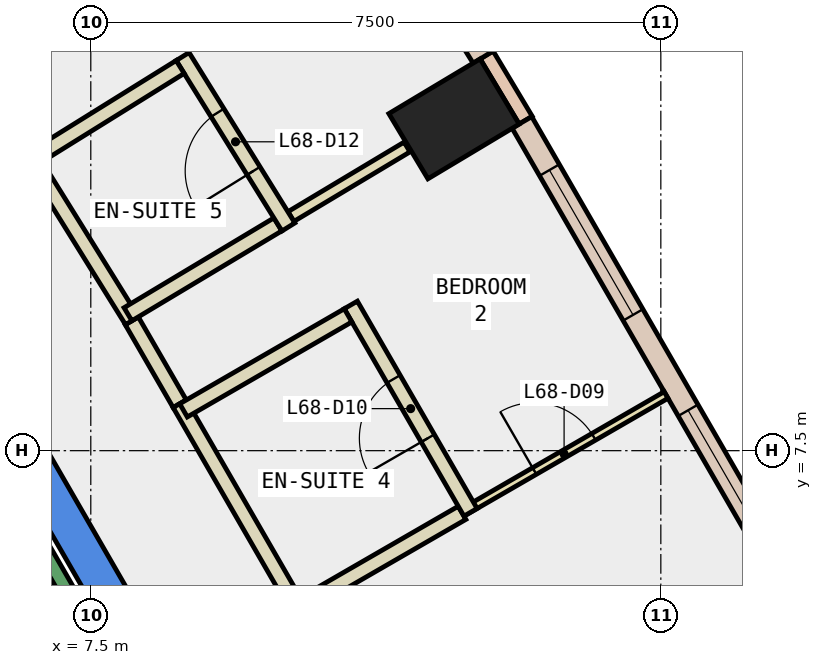
"""IFC4 building model, lengths in metres.
Left out: names, types, materials, properties, quantities, classifications, styles, units other than length and angle.
Written with IfcOpenShell. Run it as: python <this file> out.ifc"""

import sys

from ifc_helpers import new_model, si_unit, direction, frame, frame_2d, origin, origin_2d, place, context, subcontext, project, spatial, polyline, rectangle, outline, extrude, element, fill, save


model = new_model("IFC4")
c1 = context("Model", 3, precision=1e-05, world=origin(), true_north=direction((0.0, 1.0)))
c2 = subcontext(c1, "Body", "Model", "MODEL_VIEW")
j1 = project(units=[si_unit("LENGTHUNIT", "METRE"), si_unit("PLANEANGLEUNIT", "RADIAN")], contexts=[c1])
p1 = place(None, origin())
s1 = spatial("IfcSite", under=j1, at=p1, CompositionType="ELEMENT")
p2 = place(p1, origin())
s2 = spatial("IfcBuilding", under=s1, at=p2, CompositionType="ELEMENT")
p3 = place(p2, frame((0.0, 0.0, 293.6)))
s3 = spatial("IfcBuildingStorey", under=s2, at=p3, CompositionType="ELEMENT", Elevation=293.6)
p4 = place(p3, frame((12.279, 11.865, -0.34), z_axis=(0.0, 0.0, 1.0), x_axis=(-0.513945548584, 0.857822809845, 0.0)))
e1 = element("IfcColumn", 1, at=p4, inside=s3, PredefinedType="COLUMN", context=c2, shape_type="SweptSolid", body=[
    extrude(rectangle(XDim=1.0, YDim=1.4, at=origin_2d()), origin(), (0.0, 0.0, 1.0), 3.6),
])
p5 = place(p3, frame((0.0, 0.0, -0.34)))
e2 = element("IfcWall", 2, at=p5, inside=s3, PredefinedType="SHEAR", context=c2, shape_type="SweptSolid", body=[
    extrude(outline(polyline([(5.486, 9.998), (5.053, 9.748), (9.238, 2.5), (9.815, 2.5), (5.486, 9.998)])), origin(), (0.0, 0.0, 1.0), 3.6),
])
p6 = place(p3, frame((13.222, 11.848, 0.0), z_axis=(0.0, 0.0, 1.0), x_axis=(-0.513777707721, 0.857923345672, 0.0)))
e3 = element("IfcWall", 3, at=p6, inside=s3, PredefinedType="STANDARD", context=c2, shape_type="SweptSolid", body=[
    extrude(rectangle(XDim=1.0, YDim=0.2, at=frame_2d((0.5, 0.0))), origin(), (0.0, 0.0, 1.0), 3.26),
])
p7 = place(p3, frame((16.821, 5.498, 0.0), z_axis=(0.0, 0.0, 1.0), x_axis=(-0.499945412946, 0.866056917341, 0.0)))
e4 = element("IfcWall", 4, at=p7, inside=s3, PredefinedType="STANDARD", context=c2, shape_type="SweptSolid", body=[
    extrude(rectangle(XDim=7.299, YDim=0.3, at=frame_2d((3.649, 0.0))), origin(), (0.0, 0.0, 1.0), 3.26),
])
p8 = place(p7, frame((0.725, 0.0, 0.9)))
e5 = element("IfcOpeningElement", 5, at=p8, cuts=e4, PredefinedType="OPENING", context=c2, shape_type="SweptSolid", body=[
    extrude(rectangle(XDim=2.2, YDim=2.0, at=frame_2d((1.1, 1.0))), frame((0.0, 0.16, 0.0), z_axis=(0.0, -1.0, 0.0), x_axis=(1.0, 0.0, 0.0)), (0.0, 0.0, 1.0), 0.32),
])
p9 = place(p7, frame((4.374, 0.0, 0.9)))
e6 = element("IfcOpeningElement", 6, at=p9, cuts=e4, PredefinedType="OPENING", context=c2, shape_type="SweptSolid", body=[
    extrude(rectangle(XDim=2.2, YDim=2.0, at=frame_2d((1.1, 1.0))), frame((0.0, 0.16, 0.0), z_axis=(0.0, -1.0, 0.0), x_axis=(1.0, 0.0, 0.0)), (0.0, 0.0, 1.0), 0.32),
])
p10 = place(p3, frame((12.659, 12.675, 0.0), z_axis=(0.0, 0.0, 1.0), x_axis=(-0.527762071678, 0.849392250788, 0.0)))
e7 = element("IfcWall", 7, at=p10, inside=s3, PredefinedType="STANDARD", context=c2, shape_type="SweptSolid", body=[
    extrude(rectangle(XDim=7.276, YDim=0.3, at=frame_2d((3.638, 0.0))), origin(), (0.0, 0.0, 1.0), 3.26),
])
p11 = place(p10, frame((0.719, 0.0, 0.9)))
e8 = element("IfcOpeningElement", 8, at=p11, cuts=e7, PredefinedType="OPENING", context=c2, shape_type="SweptSolid", body=[
    extrude(rectangle(XDim=2.2, YDim=2.0, at=frame_2d((1.1, 1.0))), frame((0.0, 0.16, 0.0), z_axis=(0.0, -1.0, 0.0), x_axis=(1.0, 0.0, 0.0)), (0.0, 0.0, 1.0), 0.32),
])
p12 = place(p10, frame((4.357, 0.0, 0.9)))
e9 = element("IfcOpeningElement", 9, at=p12, cuts=e7, PredefinedType="OPENING", context=c2, shape_type="SweptSolid", body=[
    extrude(rectangle(XDim=2.2, YDim=2.0, at=frame_2d((1.1, 1.0))), frame((0.0, 0.16, 0.0), z_axis=(0.0, -1.0, 0.0), x_axis=(1.0, 0.0, 0.0)), (0.0, 0.0, 1.0), 0.32),
])
p13 = place(p3, frame((8.039, 9.209, 0.0), z_axis=(0.0, 0.0, 1.0), x_axis=(0.500219543227, -0.865898613334, 0.0)))
e10 = element("IfcWall", 10, at=p13, inside=s3, PredefinedType="PARTITIONING", context=c2, shape_type="SweptSolid", body=[
    extrude(rectangle(XDim=1.261, YDim=0.2, at=frame_2d((0.631, 0.0))), origin(), (0.0, 0.0, 1.0), 3.26),
])
p14 = place(p3, frame((8.67, 8.117, 0.0), z_axis=(0.0, 0.0, 1.0), x_axis=(0.50002537861, -0.866010750942, 0.0)))
e11 = element("IfcWall", 11, at=p14, inside=s3, PredefinedType="PARTITIONING", context=c2, shape_type="SweptSolid", body=[
    extrude(rectangle(XDim=3.0, YDim=0.2, at=frame_2d((1.5, 0.0))), origin(), (0.0, 0.0, 1.0), 3.26),
])
p15 = place(p3, frame((6.775, 11.249, 0.0), z_axis=(0.0, 0.0, 1.0), x_axis=(0.527803270752, -0.849366650736, 0.0)))
e12 = element("IfcWall", 12, at=p15, inside=s3, PredefinedType="PARTITIONING", context=c2, shape_type="SweptSolid", body=[
    extrude(rectangle(XDim=2.401, YDim=0.2, at=frame_2d((1.2, 0.0))), origin(), (0.0, 0.0, 1.0), 3.26),
])
p16 = place(p3, frame((12.385, 6.682, 0.0), z_axis=(0.0, 0.0, 1.0), x_axis=(0.865970446821, 0.500095176175, 0.0)))
e13 = element("IfcWall", 13, at=p16, inside=s3, PredefinedType="PARTITIONING", context=c2, shape_type="SweptSolid", body=[
    extrude(rectangle(XDim=3.1, YDim=0.1, at=frame_2d((1.55, 0.0))), origin(), (0.0, 0.0, 1.0), 3.26),
])
p17 = place(p16, frame((1.1, 0.0, 0.0)))
e14 = element("IfcOpeningElement", 14, at=p17, cuts=e13, PredefinedType="OPENING", context=c2, shape_type="SweptSolid", body=[
    extrude(rectangle(XDim=0.9, YDim=2.1, at=frame_2d((0.45, 1.05))), frame((0.0, 0.06, 0.0), z_axis=(0.0, -1.0, 0.0), x_axis=(1.0, 0.0, 0.0)), (0.0, 0.0, 1.0), 0.12),
])
p18 = place(p3, frame((10.306, 5.482, 0.0), z_axis=(0.0, 0.0, 1.0), x_axis=(0.866100915363, 0.499869187296, 0.0)))
e15 = element("IfcWall", 15, at=p18, inside=s3, PredefinedType="PARTITIONING", context=c2, shape_type="SweptSolid", body=[
    extrude(rectangle(XDim=2.401, YDim=0.2, at=frame_2d((1.2, 0.0))), origin(), (0.0, 0.0, 1.0), 3.26),
])
p19 = place(p3, frame((12.496, 6.689, 0.0), z_axis=(0.0, 0.0, 1.0), x_axis=(-0.500039995618, 0.866002311072, 0.0)))
e16 = element("IfcWall", 16, at=p19, inside=s3, PredefinedType="PARTITIONING", context=c2, shape_type="SweptSolid", body=[
    extrude(rectangle(XDim=3.15, YDim=0.2, at=frame_2d((1.575, 0.0))), origin(), (0.0, 0.0, 1.0), 3.26),
])
p20 = place(p19, frame((1.125, 0.0, 0.0)))
e17 = element("IfcOpeningElement", 17, at=p20, cuts=e16, PredefinedType="OPENING", context=c2, shape_type="SweptSolid", body=[
    extrude(rectangle(XDim=0.9, YDim=2.1, at=frame_2d((0.45, 1.05))), frame((0.0, 0.11, 0.0), z_axis=(0.0, -1.0, 0.0), x_axis=(1.0, 0.0, 0.0)), (0.0, 0.0, 1.0), 0.22),
])
p21 = place(p3, frame((10.885, 9.28, 0.0), z_axis=(0.0, 0.0, 1.0), x_axis=(-0.866022959057, -0.500004234368, 0.0)))
e18 = element("IfcWall", 18, at=p21, inside=s3, PredefinedType="PARTITIONING", context=c2, shape_type="SweptSolid", body=[
    extrude(rectangle(XDim=2.5, YDim=0.2, at=frame_2d((1.25, 0.0))), origin(), (0.0, 0.0, 1.0), 3.26),
])
p22 = place(p3, frame((10.133, 10.58, 0.0), z_axis=(0.0, 0.0, 1.0), x_axis=(0.857903919212, 0.513810145287, 0.0)))
e19 = element("IfcWall", 19, at=p22, inside=s3, PredefinedType="PARTITIONING", context=c2, shape_type="SweptSolid", body=[
    extrude(rectangle(XDim=1.781, YDim=0.15, at=frame_2d((0.891, 0.0))), origin(), (0.0, 0.0, 1.0), 3.26),
])
p23 = place(p3, frame((7.989, 9.295, 0.0), z_axis=(0.0, 0.0, 1.0), x_axis=(0.857801856135, 0.513980520654, 0.0)))
e20 = element("IfcWall", 20, at=p23, inside=s3, PredefinedType="PARTITIONING", context=c2, shape_type="SweptSolid", body=[
    extrude(rectangle(XDim=2.3, YDim=0.2, at=frame_2d((1.15, 0.0))), origin(), (0.0, 0.0, 1.0), 3.26),
])
p24 = place(p3, frame((10.1, 10.443, 0.0), z_axis=(0.0, 0.0, 1.0), x_axis=(-0.527510239672, 0.849548672555, 0.0)))
e21 = element("IfcWall", 21, at=p24, inside=s3, PredefinedType="PARTITIONING", context=c2, shape_type="SweptSolid", body=[
    extrude(rectangle(XDim=2.639, YDim=0.2, at=frame_2d((1.319, 0.0))), origin(), (0.0, 0.0, 1.0), 3.26),
])
p25 = place(p24, frame((0.869, 0.0, 0.0)))
e22 = element("IfcOpeningElement", 22, at=p25, cuts=e21, PredefinedType="OPENING", context=c2, shape_type="SweptSolid", body=[
    extrude(rectangle(XDim=0.9, YDim=2.1, at=frame_2d((0.45, 1.05))), frame((0.0, 0.11, 0.0), z_axis=(0.0, -1.0, 0.0), x_axis=(1.0, 0.0, 0.0)), (0.0, 0.0, 1.0), 0.22),
])
p26 = place(p3, frame((8.676, 12.548, 0.0), z_axis=(0.0, 0.0, 1.0), x_axis=(-0.849286670427, -0.527931957202, 0.0)))
e23 = element("IfcWall", 23, at=p26, inside=s3, PredefinedType="PARTITIONING", context=c2, shape_type="SweptSolid", body=[
    extrude(rectangle(XDim=2.199, YDim=0.2, at=frame_2d((1.1, 0.0))), origin(), (0.0, 0.0, 1.0), 3.26),
])
p27 = place(p3, frame((8.48, 3.412, 0.0), z_axis=(0.0, 0.0, 1.0), x_axis=(-0.499978703459, 0.866037698999, 0.0)))
e24 = element("IfcWall", 24, at=p27, inside=s3, PredefinedType="STANDARD", context=c2, shape_type="SweptSolid", body=[
    extrude(rectangle(XDim=6.9, YDim=0.2, at=frame_2d((3.45, 0.0))), origin(), (0.0, 0.0, 1.0), 3.26),
])
p28 = place(p8, origin())
e25 = element("IfcWindow", 25, at=p28, inside=s3, PartitioningType="SINGLE_PANEL", PredefinedType="WINDOW", context=c2, shape_type="SweptSolid", body=[
    extrude(rectangle(XDim=2.2, YDim=2.0, at=frame_2d((1.1, 1.0))), frame((0.0, 0.03, 0.0), z_axis=(0.0, -1.0, 0.0), x_axis=(1.0, 0.0, 0.0)), (0.0, 0.0, 1.0), 0.06),
])
fill(e5, e25)
p29 = place(p9, origin())
e26 = element("IfcWindow", 26, at=p29, inside=s3, PartitioningType="SINGLE_PANEL", PredefinedType="WINDOW", context=c2, shape_type="SweptSolid", body=[
    extrude(rectangle(XDim=2.2, YDim=2.0, at=frame_2d((1.1, 1.0))), frame((0.0, 0.03, 0.0), z_axis=(0.0, -1.0, 0.0), x_axis=(1.0, 0.0, 0.0)), (0.0, 0.0, 1.0), 0.06),
])
fill(e6, e26)
p30 = place(p17, origin())
e27 = element("IfcDoor", 27, at=p30, inside=s3, OperationType="SINGLE_SWING_RIGHT", PredefinedType="DOOR", context=c2, shape_type="SweptSolid", body=[
    extrude(rectangle(XDim=0.9, YDim=2.1, at=frame_2d((0.45, 1.05))), frame((0.0, 0.025, 0.0), z_axis=(0.0, -1.0, 0.0), x_axis=(1.0, 0.0, 0.0)), (0.0, 0.0, 1.0), 0.05),
])
fill(e14, e27)
p31 = place(p20, origin())
e28 = element("IfcDoor", 28, at=p31, inside=s3, OperationType="SINGLE_SWING_RIGHT", PredefinedType="DOOR", context=c2, shape_type="SweptSolid", body=[
    extrude(rectangle(XDim=0.9, YDim=2.1, at=frame_2d((0.45, 1.05))), frame((0.0, 0.025, 0.0), z_axis=(0.0, -1.0, 0.0), x_axis=(1.0, 0.0, 0.0)), (0.0, 0.0, 1.0), 0.05),
])
fill(e17, e28)
p32 = place(p25, origin())
e29 = element("IfcDoor", 29, at=p32, inside=s3, OperationType="SINGLE_SWING_LEFT", PredefinedType="DOOR", context=c2, shape_type="SweptSolid", body=[
    extrude(rectangle(XDim=0.9, YDim=2.1, at=frame_2d((0.45, 1.05))), frame((0.0, 0.025, 0.0), z_axis=(0.0, -1.0, 0.0), x_axis=(1.0, 0.0, 0.0)), (0.0, 0.0, 1.0), 0.05),
])
fill(e22, e29)
save(model, sys.argv[1])
